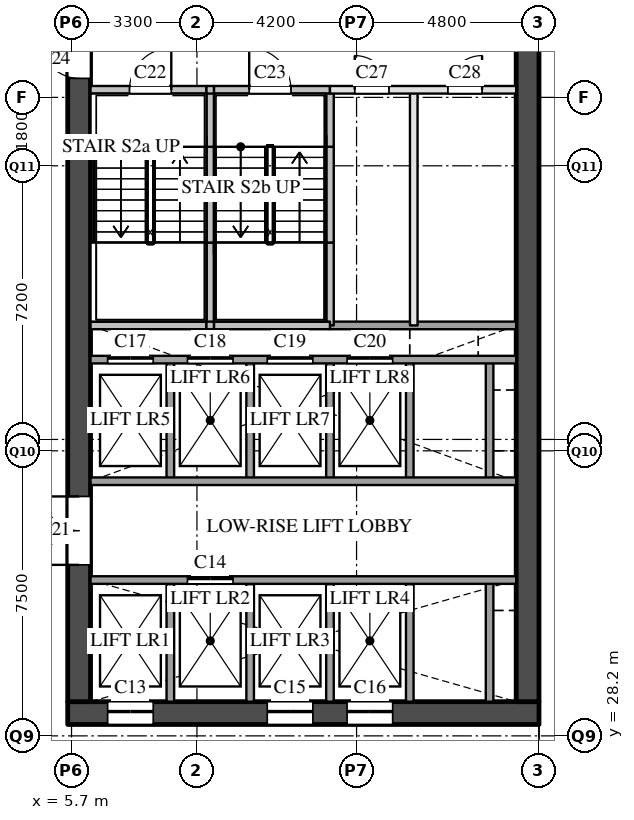
"""IFC4 building model, lengths in metres.
Left out: names, types, materials, properties, quantities, classifications, styles, units other than length and angle.
Written with IfcOpenShell. Run it as: python <this file> out.ifc"""

import sys

from ifc_helpers import new_model, si_unit, direction, frame, frame_2d, origin, place, context, subcontext, project, spatial, rectangle, extrude, element, fill, save


model = new_model("IFC4")
c1 = context("Model", 3, precision=1e-05, world=origin(), true_north=direction((0.0, 1.0)))
c2 = subcontext(c1, "Body", "Model", "MODEL_VIEW")
j1 = project(units=[si_unit("LENGTHUNIT", "METRE"), si_unit("PLANEANGLEUNIT", "RADIAN")], contexts=[c1])
p1 = place(None, origin())
s1 = spatial("IfcSite", under=j1, at=p1, CompositionType="ELEMENT")
p2 = place(p1, origin())
s2 = spatial("IfcBuilding", under=s1, at=p2, CompositionType="ELEMENT")
p3 = place(p2, frame((0.0, 0.0, 14.0)))
s3 = spatial("IfcBuildingStorey", under=s2, at=p3, CompositionType="ELEMENT", Elevation=14.0)
p4 = place(p3, frame((5.6, 28.8, 0.0), z_axis=(0.0, 0.0, 1.0), x_axis=(1.0, 0.0, 0.0)))
e1 = element("IfcWall", 1, at=p4, inside=s3, PredefinedType="SHEAR", context=c2, shape_type="SweptSolid", body=[
    extrude(rectangle(XDim=12.4, YDim=0.6, at=frame_2d((6.2, 0.0))), origin(), (0.0, 0.0, 1.0), 6.59),
])
p5 = place(p4, frame((1.05, 0.0, 0.0)))
e2 = element("IfcOpeningElement", 2, at=p5, cuts=e1, PredefinedType="OPENING", context=c2, shape_type="SweptSolid", body=[
    extrude(rectangle(XDim=1.2, YDim=2.1, at=frame_2d((0.6, 1.05))), frame((0.0, 0.31, 0.0), z_axis=(0.0, -1.0, 0.0), x_axis=(1.0, 0.0, 0.0)), (0.0, 0.0, 1.0), 0.62),
])
p6 = place(p4, frame((5.25, 0.0, 0.0)))
e3 = element("IfcOpeningElement", 3, at=p6, cuts=e1, PredefinedType="OPENING", context=c2, shape_type="SweptSolid", body=[
    extrude(rectangle(XDim=1.2, YDim=2.1, at=frame_2d((0.6, 1.05))), frame((0.0, 0.31, 0.0), z_axis=(0.0, -1.0, 0.0), x_axis=(1.0, 0.0, 0.0)), (0.0, 0.0, 1.0), 0.62),
])
p7 = place(p4, frame((7.35, 0.0, 0.0)))
e4 = element("IfcOpeningElement", 4, at=p7, cuts=e1, PredefinedType="OPENING", context=c2, shape_type="SweptSolid", body=[
    extrude(rectangle(XDim=1.2, YDim=2.1, at=frame_2d((0.6, 1.05))), frame((0.0, 0.31, 0.0), z_axis=(0.0, -1.0, 0.0), x_axis=(1.0, 0.0, 0.0)), (0.0, 0.0, 1.0), 0.62),
])
p8 = place(p3, frame((5.9, 29.1, 0.0), z_axis=(0.0, 0.0, 1.0), x_axis=(0.0, 1.0, 0.0)))
e5 = element("IfcWall", 5, at=p8, inside=s3, PredefinedType="SHEAR", context=c2, shape_type="SweptSolid", body=[
    extrude(rectangle(XDim=20.3, YDim=0.6, at=frame_2d((10.15, 0.0))), origin(), (0.0, 0.0, 1.0), 6.59),
])
p9 = place(p8, frame((3.6, 0.0, 0.0)))
e6 = element("IfcOpeningElement", 6, at=p9, cuts=e5, PredefinedType="OPENING", context=c2, shape_type="SweptSolid", body=[
    extrude(rectangle(XDim=1.8, YDim=2.1, at=frame_2d((0.9, 1.05))), frame((0.0, 0.31, 0.0), z_axis=(0.0, -1.0, 0.0), x_axis=(1.0, 0.0, 0.0)), (0.0, 0.0, 1.0), 0.62),
])
p10 = place(p8, frame((16.4, 0.0, 0.0)))
e7 = element("IfcOpeningElement", 7, at=p10, cuts=e5, PredefinedType="OPENING", context=c2, shape_type="SweptSolid", body=[
    extrude(rectangle(XDim=1.0, YDim=2.1, at=frame_2d((0.5, 1.05))), frame((0.0, 0.31, 0.0), z_axis=(0.0, -1.0, 0.0), x_axis=(1.0, 0.0, 0.0)), (0.0, 0.0, 1.0), 0.62),
])
p11 = place(p3, frame((17.7, 29.1, 0.0), z_axis=(0.0, 0.0, 1.0), x_axis=(0.0, 1.0, 0.0)))
e8 = element("IfcWall", 8, at=p11, inside=s3, PredefinedType="SHEAR", context=c2, shape_type="SweptSolid", body=[
    extrude(rectangle(XDim=20.3, YDim=0.6, at=frame_2d((10.15, 0.0))), origin(), (0.0, 0.0, 1.0), 6.59),
])
p12 = place(p3, frame((8.3, 29.1, 0.0), z_axis=(0.0, 0.0, 1.0), x_axis=(0.0, 1.0, 0.0)))
e9 = element("IfcWall", 9, at=p12, inside=s3, PredefinedType="SOLIDWALL", context=c2, shape_type="SweptSolid", body=[
    extrude(rectangle(XDim=3.2, YDim=0.2, at=frame_2d((1.6, 0.0))), origin(), (0.0, 0.0, 1.0), 6.59),
])
p13 = place(p3, frame((8.3, 34.9, 0.0), z_axis=(0.0, 0.0, 1.0), x_axis=(0.0, 1.0, 0.0)))
e10 = element("IfcWall", 10, at=p13, inside=s3, PredefinedType="SOLIDWALL", context=c2, shape_type="SweptSolid", body=[
    extrude(rectangle(XDim=3.2, YDim=0.2, at=frame_2d((1.6, 0.0))), origin(), (0.0, 0.0, 1.0), 6.59),
])
p14 = place(p3, frame((9.35, 39.0, 0.0), z_axis=(0.0, 0.0, 1.0), x_axis=(0.0, 1.0, 0.0)))
e11 = element("IfcWall", 11, at=p14, inside=s3, PredefinedType="SOLIDWALL", context=c2, shape_type="SweptSolid", body=[
    extrude(rectangle(XDim=2.18, YDim=0.2, at=frame_2d((1.09, 0.0))), origin(), (0.0, 0.0, 1.0), 6.59),
])
p15 = place(p3, frame((9.35, 41.18, 0.0), z_axis=(0.0, 0.0, 1.0), x_axis=(0.0, 1.0, 0.0)))
e12 = element("IfcWall", 12, at=p15, inside=s3, PredefinedType="SOLIDWALL", context=c2, shape_type="SweptSolid", body=[
    extrude(rectangle(XDim=2.52, YDim=0.2, at=frame_2d((1.26, 0.0))), origin(), (0.0, 0.0, 1.0), 6.59),
])
p16 = place(p3, frame((9.35, 43.7, 0.0), z_axis=(0.0, 0.0, 1.0), x_axis=(0.0, 1.0, 0.0)))
e13 = element("IfcWall", 13, at=p16, inside=s3, PredefinedType="SOLIDWALL", context=c2, shape_type="SweptSolid", body=[
    extrude(rectangle(XDim=1.5, YDim=0.2, at=frame_2d((0.75, 0.0))), origin(), (0.0, 0.0, 1.0), 6.59),
])
p17 = place(p3, frame((10.4, 29.1, 0.0), z_axis=(0.0, 0.0, 1.0), x_axis=(0.0, 1.0, 0.0)))
e14 = element("IfcWall", 14, at=p17, inside=s3, PredefinedType="SOLIDWALL", context=c2, shape_type="SweptSolid", body=[
    extrude(rectangle(XDim=3.2, YDim=0.2, at=frame_2d((1.6, 0.0))), origin(), (0.0, 0.0, 1.0), 6.59),
])
p18 = place(p3, frame((10.4, 34.9, 0.0), z_axis=(0.0, 0.0, 1.0), x_axis=(0.0, 1.0, 0.0)))
e15 = element("IfcWall", 15, at=p18, inside=s3, PredefinedType="SOLIDWALL", context=c2, shape_type="SweptSolid", body=[
    extrude(rectangle(XDim=3.2, YDim=0.2, at=frame_2d((1.6, 0.0))), origin(), (0.0, 0.0, 1.0), 6.59),
])
p19 = place(p3, frame((12.5, 29.1, 0.0), z_axis=(0.0, 0.0, 1.0), x_axis=(0.0, 1.0, 0.0)))
e16 = element("IfcWall", 16, at=p19, inside=s3, PredefinedType="SOLIDWALL", context=c2, shape_type="SweptSolid", body=[
    extrude(rectangle(XDim=3.2, YDim=0.2, at=frame_2d((1.6, 0.0))), origin(), (0.0, 0.0, 1.0), 6.59),
])
p20 = place(p3, frame((12.5, 34.9, 0.0), z_axis=(0.0, 0.0, 1.0), x_axis=(0.0, 1.0, 0.0)))
e17 = element("IfcWall", 17, at=p20, inside=s3, PredefinedType="SOLIDWALL", context=c2, shape_type="SweptSolid", body=[
    extrude(rectangle(XDim=3.2, YDim=0.2, at=frame_2d((1.6, 0.0))), origin(), (0.0, 0.0, 1.0), 6.59),
])
p21 = place(p3, frame((12.5, 39.0, 0.0), z_axis=(0.0, 0.0, 1.0), x_axis=(0.0, 1.0, 0.0)))
e18 = element("IfcWall", 18, at=p21, inside=s3, PredefinedType="SOLIDWALL", context=c2, shape_type="SweptSolid", body=[
    extrude(rectangle(XDim=2.18, YDim=0.2, at=frame_2d((1.09, 0.0))), origin(), (0.0, 0.0, 1.0), 6.59),
])
p22 = place(p3, frame((12.5, 41.18, 0.0), z_axis=(0.0, 0.0, 1.0), x_axis=(0.0, 1.0, 0.0)))
e19 = element("IfcWall", 19, at=p22, inside=s3, PredefinedType="SOLIDWALL", context=c2, shape_type="SweptSolid", body=[
    extrude(rectangle(XDim=2.52, YDim=0.2, at=frame_2d((1.26, 0.0))), origin(), (0.0, 0.0, 1.0), 6.59),
])
p23 = place(p3, frame((12.5, 43.7, 0.0), z_axis=(0.0, 0.0, 1.0), x_axis=(0.0, 1.0, 0.0)))
e20 = element("IfcWall", 20, at=p23, inside=s3, PredefinedType="SOLIDWALL", context=c2, shape_type="SweptSolid", body=[
    extrude(rectangle(XDim=1.5, YDim=0.2, at=frame_2d((0.75, 0.0))), origin(), (0.0, 0.0, 1.0), 6.59),
])
p24 = place(p3, frame((14.6, 29.1, 0.0), z_axis=(0.0, 0.0, 1.0), x_axis=(0.0, 1.0, 0.0)))
e21 = element("IfcWall", 21, at=p24, inside=s3, PredefinedType="SOLIDWALL", context=c2, shape_type="SweptSolid", body=[
    extrude(rectangle(XDim=3.2, YDim=0.2, at=frame_2d((1.6, 0.0))), origin(), (0.0, 0.0, 1.0), 6.59),
])
p25 = place(p3, frame((14.6, 34.9, 0.0), z_axis=(0.0, 0.0, 1.0), x_axis=(0.0, 1.0, 0.0)))
e22 = element("IfcWall", 22, at=p25, inside=s3, PredefinedType="SOLIDWALL", context=c2, shape_type="SweptSolid", body=[
    extrude(rectangle(XDim=3.2, YDim=0.2, at=frame_2d((1.6, 0.0))), origin(), (0.0, 0.0, 1.0), 6.59),
])
p26 = place(p3, frame((14.705, 39.0, 0.0), z_axis=(0.0, 0.0, 1.0), x_axis=(0.0, 1.0, 0.0)))
e23 = element("IfcWall", 23, at=p26, inside=s3, PredefinedType="PARTITIONING", context=c2, shape_type="SweptSolid", body=[
    extrude(rectangle(XDim=6.2, YDim=0.2, at=frame_2d((3.1, 0.0))), origin(), (0.0, 0.0, 1.0), 6.59),
])
p27 = place(p3, frame((16.7, 29.1, 0.0), z_axis=(0.0, 0.0, 1.0), x_axis=(0.0, 1.0, 0.0)))
e24 = element("IfcWall", 24, at=p27, inside=s3, PredefinedType="SOLIDWALL", context=c2, shape_type="SweptSolid", body=[
    extrude(rectangle(XDim=3.2, YDim=0.2, at=frame_2d((1.6, 0.0))), origin(), (0.0, 0.0, 1.0), 6.59),
])
p28 = place(p3, frame((16.7, 34.9, 0.0), z_axis=(0.0, 0.0, 1.0), x_axis=(0.0, 1.0, 0.0)))
e25 = element("IfcWall", 25, at=p28, inside=s3, PredefinedType="SOLIDWALL", context=c2, shape_type="SweptSolid", body=[
    extrude(rectangle(XDim=3.2, YDim=0.2, at=frame_2d((1.6, 0.0))), origin(), (0.0, 0.0, 1.0), 6.59),
])
p29 = place(p3, frame((6.2, 32.3, 0.0), z_axis=(0.0, 0.0, 1.0), x_axis=(1.0, 0.0, 0.0)))
e26 = element("IfcWall", 26, at=p29, inside=s3, PredefinedType="SOLIDWALL", context=c2, shape_type="SweptSolid", body=[
    extrude(rectangle(XDim=11.2, YDim=0.2, at=frame_2d((5.6, 0.0))), origin(), (0.0, 0.0, 1.0), 6.59),
])
p30 = place(p29, frame((2.55, 0.0, 0.0)))
e27 = element("IfcOpeningElement", 27, at=p30, cuts=e26, PredefinedType="OPENING", context=c2, shape_type="SweptSolid", body=[
    extrude(rectangle(XDim=1.2, YDim=2.1, at=frame_2d((0.6, 1.05))), frame((0.0, 0.11, 0.0), z_axis=(0.0, -1.0, 0.0), x_axis=(1.0, 0.0, 0.0)), (0.0, 0.0, 1.0), 0.22),
])
p31 = place(p3, frame((6.2, 34.9, 0.0), z_axis=(0.0, 0.0, 1.0), x_axis=(1.0, 0.0, 0.0)))
e28 = element("IfcWall", 28, at=p31, inside=s3, PredefinedType="SOLIDWALL", context=c2, shape_type="SweptSolid", body=[
    extrude(rectangle(XDim=11.2, YDim=0.2, at=frame_2d((5.6, 0.0))), origin(), (0.0, 0.0, 1.0), 6.59),
])
p32 = place(p3, frame((6.2, 38.1, 0.0), z_axis=(0.0, 0.0, 1.0), x_axis=(1.0, 0.0, 0.0)))
e29 = element("IfcWall", 29, at=p32, inside=s3, PredefinedType="SOLIDWALL", context=c2, shape_type="SweptSolid", body=[
    extrude(rectangle(XDim=11.2, YDim=0.2, at=frame_2d((5.6, 0.0))), origin(), (0.0, 0.0, 1.0), 6.59),
])
p33 = place(p32, frame((0.45, 0.0, 0.0)))
e30 = element("IfcOpeningElement", 30, at=p33, cuts=e29, PredefinedType="OPENING", context=c2, shape_type="SweptSolid", body=[
    extrude(rectangle(XDim=1.2, YDim=2.1, at=frame_2d((0.6, 1.05))), frame((0.0, 0.11, 0.0), z_axis=(0.0, -1.0, 0.0), x_axis=(1.0, 0.0, 0.0)), (0.0, 0.0, 1.0), 0.22),
])
p34 = place(p32, frame((2.55, 0.0, 0.0)))
e31 = element("IfcOpeningElement", 31, at=p34, cuts=e29, PredefinedType="OPENING", context=c2, shape_type="SweptSolid", body=[
    extrude(rectangle(XDim=1.2, YDim=2.1, at=frame_2d((0.6, 1.05))), frame((0.0, 0.11, 0.0), z_axis=(0.0, -1.0, 0.0), x_axis=(1.0, 0.0, 0.0)), (0.0, 0.0, 1.0), 0.22),
])
p35 = place(p32, frame((4.65, 0.0, 0.0)))
e32 = element("IfcOpeningElement", 32, at=p35, cuts=e29, PredefinedType="OPENING", context=c2, shape_type="SweptSolid", body=[
    extrude(rectangle(XDim=1.2, YDim=2.1, at=frame_2d((0.6, 1.05))), frame((0.0, 0.11, 0.0), z_axis=(0.0, -1.0, 0.0), x_axis=(1.0, 0.0, 0.0)), (0.0, 0.0, 1.0), 0.22),
])
p36 = place(p32, frame((6.75, 0.0, 0.0)))
e33 = element("IfcOpeningElement", 33, at=p36, cuts=e29, PredefinedType="OPENING", context=c2, shape_type="SweptSolid", body=[
    extrude(rectangle(XDim=1.2, YDim=2.1, at=frame_2d((0.6, 1.05))), frame((0.0, 0.11, 0.0), z_axis=(0.0, -1.0, 0.0), x_axis=(1.0, 0.0, 0.0)), (0.0, 0.0, 1.0), 0.22),
])
p37 = place(p3, frame((12.5, 39.0, 0.0), z_axis=(0.0, 0.0, 1.0), x_axis=(1.0, 0.0, 0.0)))
e34 = element("IfcWall", 34, at=p37, inside=s3, PredefinedType="SOLIDWALL", context=c2, shape_type="SweptSolid", body=[
    extrude(rectangle(XDim=4.9, YDim=0.2, at=frame_2d((2.45, 0.0))), origin(), (0.0, 0.0, 1.0), 6.59),
])
p38 = place(p3, frame((6.2, 39.0, 0.0), z_axis=(0.0, 0.0, 1.0), x_axis=(1.0, 0.0, 0.0)))
e35 = element("IfcWall", 35, at=p38, inside=s3, PredefinedType="SOLIDWALL", context=c2, shape_type="SweptSolid", body=[
    extrude(rectangle(XDim=3.05, YDim=0.2, at=frame_2d((1.525, 0.0))), origin(), (0.0, 0.0, 1.0), 6.59),
])
p39 = place(p3, frame((9.25, 39.0, 0.0), z_axis=(0.0, 0.0, 1.0), x_axis=(1.0, 0.0, 0.0)))
e36 = element("IfcWall", 36, at=p39, inside=s3, PredefinedType="SOLIDWALL", context=c2, shape_type="SweptSolid", body=[
    extrude(rectangle(XDim=0.2, YDim=0.2, at=frame_2d((0.1, 0.0))), origin(), (0.0, 0.0, 1.0), 6.59),
])
p40 = place(p3, frame((9.45, 39.0, 0.0), z_axis=(0.0, 0.0, 1.0), x_axis=(1.0, 0.0, 0.0)))
e37 = element("IfcWall", 37, at=p40, inside=s3, PredefinedType="SOLIDWALL", context=c2, shape_type="SweptSolid", body=[
    extrude(rectangle(XDim=3.05, YDim=0.2, at=frame_2d((1.525, 0.0))), origin(), (0.0, 0.0, 1.0), 6.59),
])
p41 = place(p3, frame((12.5, 45.2, 0.0), z_axis=(0.0, 0.0, 1.0), x_axis=(1.0, 0.0, 0.0)))
e38 = element("IfcWall", 38, at=p41, inside=s3, PredefinedType="PARTITIONING", context=c2, shape_type="SweptSolid", body=[
    extrude(rectangle(XDim=4.9, YDim=0.2, at=frame_2d((2.45, 0.0))), origin(), (0.0, 0.0, 1.0), 6.59),
])
p42 = place(p41, frame((0.653, 0.0, 0.0)))
e39 = element("IfcOpeningElement", 39, at=p42, cuts=e38, PredefinedType="OPENING", context=c2, shape_type="SweptSolid", body=[
    extrude(rectangle(XDim=0.9, YDim=2.1, at=frame_2d((0.45, 1.05))), frame((0.0, 0.11, 0.0), z_axis=(0.0, -1.0, 0.0), x_axis=(1.0, 0.0, 0.0)), (0.0, 0.0, 1.0), 0.22),
])
p43 = place(p41, frame((3.103, 0.0, 0.0)))
e40 = element("IfcOpeningElement", 40, at=p43, cuts=e38, PredefinedType="OPENING", context=c2, shape_type="SweptSolid", body=[
    extrude(rectangle(XDim=0.9, YDim=2.1, at=frame_2d((0.45, 1.05))), frame((0.0, 0.11, 0.0), z_axis=(0.0, -1.0, 0.0), x_axis=(1.0, 0.0, 0.0)), (0.0, 0.0, 1.0), 0.22),
])
p44 = place(p3, frame((6.2, 45.2, 0.0), z_axis=(0.0, 0.0, 1.0), x_axis=(1.0, 0.0, 0.0)))
e41 = element("IfcWall", 41, at=p44, inside=s3, PredefinedType="SOLIDWALL", context=c2, shape_type="SweptSolid", body=[
    extrude(rectangle(XDim=3.05, YDim=0.2, at=frame_2d((1.525, 0.0))), origin(), (0.0, 0.0, 1.0), 6.59),
])
p45 = place(p44, frame((1.025, 0.0, 0.0)))
e42 = element("IfcOpeningElement", 42, at=p45, cuts=e41, PredefinedType="OPENING", context=c2, shape_type="SweptSolid", body=[
    extrude(rectangle(XDim=1.1, YDim=2.1, at=frame_2d((0.55, 1.05))), frame((0.0, 0.11, 0.0), z_axis=(0.0, -1.0, 0.0), x_axis=(1.0, 0.0, 0.0)), (0.0, 0.0, 1.0), 0.22),
])
p46 = place(p3, frame((9.25, 45.2, 0.0), z_axis=(0.0, 0.0, 1.0), x_axis=(1.0, 0.0, 0.0)))
e43 = element("IfcWall", 43, at=p46, inside=s3, PredefinedType="SOLIDWALL", context=c2, shape_type="SweptSolid", body=[
    extrude(rectangle(XDim=0.2, YDim=0.2, at=frame_2d((0.1, 0.0))), origin(), (0.0, 0.0, 1.0), 6.59),
])
p47 = place(p3, frame((9.45, 45.2, 0.0), z_axis=(0.0, 0.0, 1.0), x_axis=(1.0, 0.0, 0.0)))
e44 = element("IfcWall", 44, at=p47, inside=s3, PredefinedType="SOLIDWALL", context=c2, shape_type="SweptSolid", body=[
    extrude(rectangle(XDim=3.05, YDim=0.2, at=frame_2d((1.525, 0.0))), origin(), (0.0, 0.0, 1.0), 6.59),
])
p48 = place(p47, frame((0.925, 0.0, 0.0)))
e45 = element("IfcOpeningElement", 45, at=p48, cuts=e44, PredefinedType="OPENING", context=c2, shape_type="SweptSolid", body=[
    extrude(rectangle(XDim=1.1, YDim=2.1, at=frame_2d((0.55, 1.05))), frame((0.0, 0.11, 0.0), z_axis=(0.0, -1.0, 0.0), x_axis=(1.0, 0.0, 0.0)), (0.0, 0.0, 1.0), 0.22),
])
p49 = place(p5, origin())
e46 = element("IfcDoor", 46, at=p49, inside=s3, OperationType="SLIDING_TO_LEFT", PredefinedType="DOOR", context=c2, shape_type="SweptSolid", body=[
    extrude(rectangle(XDim=1.2, YDim=2.1, at=frame_2d((0.6, 1.05))), frame((0.0, 0.025, 0.0), z_axis=(0.0, -1.0, 0.0), x_axis=(1.0, 0.0, 0.0)), (0.0, 0.0, 1.0), 0.05),
])
fill(e2, e46)
p50 = place(p30, origin())
e47 = element("IfcDoor", 47, at=p50, inside=s3, OperationType="SLIDING_TO_LEFT", PredefinedType="DOOR", context=c2, shape_type="SweptSolid", body=[
    extrude(rectangle(XDim=1.2, YDim=2.1, at=frame_2d((0.6, 1.05))), frame((0.0, 0.025, 0.0), z_axis=(0.0, -1.0, 0.0), x_axis=(1.0, 0.0, 0.0)), (0.0, 0.0, 1.0), 0.05),
])
fill(e27, e47)
p51 = place(p6, origin())
e48 = element("IfcDoor", 48, at=p51, inside=s3, OperationType="SLIDING_TO_LEFT", PredefinedType="DOOR", context=c2, shape_type="SweptSolid", body=[
    extrude(rectangle(XDim=1.2, YDim=2.1, at=frame_2d((0.6, 1.05))), frame((0.0, 0.025, 0.0), z_axis=(0.0, -1.0, 0.0), x_axis=(1.0, 0.0, 0.0)), (0.0, 0.0, 1.0), 0.05),
])
fill(e3, e48)
p52 = place(p7, origin())
e49 = element("IfcDoor", 49, at=p52, inside=s3, OperationType="SLIDING_TO_LEFT", PredefinedType="DOOR", context=c2, shape_type="SweptSolid", body=[
    extrude(rectangle(XDim=1.2, YDim=2.1, at=frame_2d((0.6, 1.05))), frame((0.0, 0.025, 0.0), z_axis=(0.0, -1.0, 0.0), x_axis=(1.0, 0.0, 0.0)), (0.0, 0.0, 1.0), 0.05),
])
fill(e4, e49)
p53 = place(p33, origin())
e50 = element("IfcDoor", 50, at=p53, inside=s3, OperationType="SLIDING_TO_LEFT", PredefinedType="DOOR", context=c2, shape_type="SweptSolid", body=[
    extrude(rectangle(XDim=1.2, YDim=2.1, at=frame_2d((0.6, 1.05))), frame((0.0, 0.025, 0.0), z_axis=(0.0, -1.0, 0.0), x_axis=(1.0, 0.0, 0.0)), (0.0, 0.0, 1.0), 0.05),
])
fill(e30, e50)
p54 = place(p34, origin())
e51 = element("IfcDoor", 51, at=p54, inside=s3, OperationType="SLIDING_TO_LEFT", PredefinedType="DOOR", context=c2, shape_type="SweptSolid", body=[
    extrude(rectangle(XDim=1.2, YDim=2.1, at=frame_2d((0.6, 1.05))), frame((0.0, 0.025, 0.0), z_axis=(0.0, -1.0, 0.0), x_axis=(1.0, 0.0, 0.0)), (0.0, 0.0, 1.0), 0.05),
])
fill(e31, e51)
p55 = place(p35, origin())
e52 = element("IfcDoor", 52, at=p55, inside=s3, OperationType="SLIDING_TO_LEFT", PredefinedType="DOOR", context=c2, shape_type="SweptSolid", body=[
    extrude(rectangle(XDim=1.2, YDim=2.1, at=frame_2d((0.6, 1.05))), frame((0.0, 0.025, 0.0), z_axis=(0.0, -1.0, 0.0), x_axis=(1.0, 0.0, 0.0)), (0.0, 0.0, 1.0), 0.05),
])
fill(e32, e52)
p56 = place(p36, origin())
e53 = element("IfcDoor", 53, at=p56, inside=s3, OperationType="SLIDING_TO_LEFT", PredefinedType="DOOR", context=c2, shape_type="SweptSolid", body=[
    extrude(rectangle(XDim=1.2, YDim=2.1, at=frame_2d((0.6, 1.05))), frame((0.0, 0.025, 0.0), z_axis=(0.0, -1.0, 0.0), x_axis=(1.0, 0.0, 0.0)), (0.0, 0.0, 1.0), 0.05),
])
fill(e33, e53)
p57 = place(p9, origin())
e54 = element("IfcDoor", 54, at=p57, inside=s3, OperationType="DOUBLE_DOOR_SINGLE_SWING", PredefinedType="DOOR", context=c2, shape_type="SweptSolid", body=[
    extrude(rectangle(XDim=1.8, YDim=2.1, at=frame_2d((0.9, 1.05))), frame((0.0, 0.025, 0.0), z_axis=(0.0, -1.0, 0.0), x_axis=(1.0, 0.0, 0.0)), (0.0, 0.0, 1.0), 0.05),
])
fill(e6, e54)
p58 = place(p45, origin())
e55 = element("IfcDoor", 55, at=p58, inside=s3, OperationType="SINGLE_SWING_RIGHT", PredefinedType="DOOR", context=c2, shape_type="SweptSolid", body=[
    extrude(rectangle(XDim=1.1, YDim=2.1, at=frame_2d((0.55, 1.05))), frame((0.0, 0.025, 0.0), z_axis=(0.0, -1.0, 0.0), x_axis=(1.0, 0.0, 0.0)), (0.0, 0.0, 1.0), 0.05),
])
fill(e42, e55)
p59 = place(p48, origin())
e56 = element("IfcDoor", 56, at=p59, inside=s3, OperationType="SINGLE_SWING_LEFT", PredefinedType="DOOR", context=c2, shape_type="SweptSolid", body=[
    extrude(rectangle(XDim=1.1, YDim=2.1, at=frame_2d((0.55, 1.05))), frame((0.0, 0.025, 0.0), z_axis=(0.0, -1.0, 0.0), x_axis=(1.0, 0.0, 0.0)), (0.0, 0.0, 1.0), 0.05),
])
fill(e45, e56)
p60 = place(p10, origin())
e57 = element("IfcDoor", 57, at=p60, inside=s3, OperationType="SINGLE_SWING_RIGHT", PredefinedType="DOOR", context=c2, shape_type="SweptSolid", body=[
    extrude(rectangle(XDim=1.0, YDim=2.1, at=frame_2d((0.5, 1.05))), frame((0.0, 0.025, 0.0), z_axis=(0.0, -1.0, 0.0), x_axis=(1.0, 0.0, 0.0)), (0.0, 0.0, 1.0), 0.05),
])
fill(e7, e57)
p61 = place(p42, origin())
e58 = element("IfcDoor", 58, at=p61, inside=s3, OperationType="SINGLE_SWING_LEFT", PredefinedType="DOOR", context=c2, shape_type="SweptSolid", body=[
    extrude(rectangle(XDim=0.9, YDim=2.1, at=frame_2d((0.45, 1.05))), frame((0.0, 0.025, 0.0), z_axis=(0.0, -1.0, 0.0), x_axis=(1.0, 0.0, 0.0)), (0.0, 0.0, 1.0), 0.05),
])
fill(e39, e58)
p62 = place(p43, origin())
e59 = element("IfcDoor", 59, at=p62, inside=s3, OperationType="SINGLE_SWING_RIGHT", PredefinedType="DOOR", context=c2, shape_type="SweptSolid", body=[
    extrude(rectangle(XDim=0.9, YDim=2.1, at=frame_2d((0.45, 1.05))), frame((0.0, 0.025, 0.0), z_axis=(0.0, -1.0, 0.0), x_axis=(1.0, 0.0, 0.0)), (0.0, 0.0, 1.0), 0.05),
])
fill(e40, e59)
save(model, sys.argv[1])
